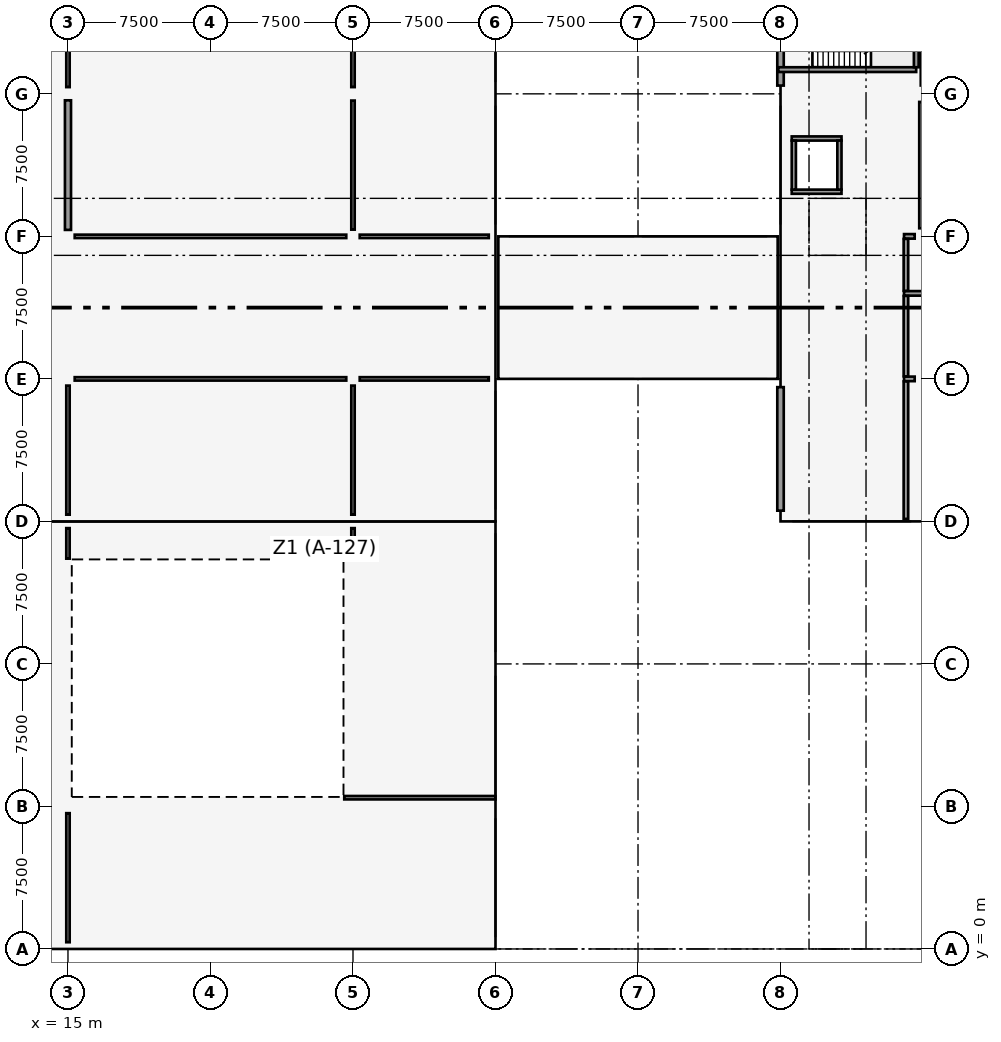
"""IFC4 building model, lengths in metres.
Left out: names, types, materials, properties, quantities, classifications, styles, units other than length and angle.
Written with IfcOpenShell. Run it as: python <this file> out.ifc"""

import sys

from ifc_helpers import new_model, si_unit, direction, frame, frame_2d, origin, origin_2d, place, context, subcontext, project, spatial, rectangle, extrude, element, fill, save


model = new_model("IFC4")
c1 = context("Model", 3, precision=1e-05, world=origin(), true_north=direction((0.0, 1.0)))
c2 = subcontext(c1, "Body", "Model", "MODEL_VIEW")
j1 = project(units=[si_unit("LENGTHUNIT", "METRE"), si_unit("PLANEANGLEUNIT", "RADIAN")], contexts=[c1])
p1 = place(None, origin())
s1 = spatial("IfcSite", under=j1, at=p1, CompositionType="ELEMENT")
p2 = place(p1, origin())
s2 = spatial("IfcBuilding", under=s1, at=p2, CompositionType="ELEMENT")
p3 = place(p2, frame((0.0, 0.0, 4.8)))
s3 = spatial("IfcBuildingStorey", under=s2, at=p3, CompositionType="ELEMENT", Elevation=4.8)
p4 = place(p3, frame((52.5, 22.5, 0.0), z_axis=(0.0, 0.0, 1.0), x_axis=(1.0, 0.0, 0.0)))
e1 = element("IfcColumn", 1, at=p4, inside=s3, PredefinedType="COLUMN", context=c2, shape_type="SweptSolid", body=[
    extrude(rectangle(XDim=0.6, YDim=1.1, at=origin_2d()), origin(), (0.0, 0.0, 1.0), 4.2),
])
for number, where, z_axis, x_axis in (
    (2, (52.5, 30.0, 0.0), (0.0, 0.0, 1.0), (1.0, 0.0, 0.0)),
    (3, (52.5, 37.5, 0.0), (0.0, 0.0, 1.0), (1.0, 0.0, 0.0)),
    (4, (52.5, 45.0, 0.0), (0.0, 0.0, 1.0), (1.0, 0.0, 0.0)),
    (5, (60.0, 22.5, 0.0), (0.0, 0.0, 1.0), (1.0, 0.0, 0.0)),
    (6, (60.0, 30.0, 0.0), (0.0, 0.0, 1.0), (1.0, 0.0, 0.0)),
    (7, (60.0, 37.5, 0.0), (0.0, 0.0, 1.0), (1.0, 0.0, 0.0)),
    (8, (60.0, 45.0, 0.0), (0.0, 0.0, 1.0), (1.0, 0.0, 0.0)),
):
    element("IfcColumn", number, at=place(p3, frame(where, z_axis=z_axis, x_axis=x_axis)), inside=s3, PredefinedType="COLUMN", context=c2, shape_type="SweptSolid", body=[
        extrude(rectangle(XDim=0.85, YDim=0.85, at=origin_2d()), origin(), (0.0, 0.0, 1.0), 4.2),
    ])
for number, where, z_axis, x_axis in (
    (9, (15.0, 0.0, 0.0), (0.0, 0.0, 1.0), (1.0, 0.0, 0.0)),
    (10, (15.0, 7.5, 0.0), (0.0, 0.0, 1.0), (1.0, 0.0, 0.0)),
    (11, (15.0, 15.0, 0.0), (0.0, 0.0, 1.0), (1.0, 0.0, 0.0)),
    (12, (15.0, 22.5, 0.0), (0.0, 0.0, 1.0), (1.0, 0.0, 0.0)),
    (13, (15.0, 30.0, 0.0), (0.0, 0.0, 1.0), (1.0, 0.0, 0.0)),
    (14, (15.0, 37.5, 0.0), (0.0, 0.0, 1.0), (1.0, 0.0, 0.0)),
    (15, (15.0, 45.0, 0.0), (0.0, 0.0, 1.0), (1.0, 0.0, 0.0)),
    (16, (30.0, 0.0, 0.0), (0.0, 0.0, 1.0), (1.0, 0.0, 0.0)),
    (17, (30.0, 7.5, 0.0), (0.0, 0.0, 1.0), (1.0, 0.0, 0.0)),
    (18, (30.0, 15.0, 0.0), (0.0, 0.0, 1.0), (1.0, 0.0, 0.0)),
    (19, (30.0, 22.5, 0.0), (0.0, 0.0, 1.0), (1.0, 0.0, 0.0)),
    (20, (30.0, 30.0, 0.0), (0.0, 0.0, 1.0), (1.0, 0.0, 0.0)),
    (21, (30.0, 37.5, 0.0), (0.0, 0.0, 1.0), (1.0, 0.0, 0.0)),
    (22, (30.0, 45.0, 0.0), (0.0, 0.0, 1.0), (1.0, 0.0, 0.0)),
    (23, (37.5, 0.0, 0.0), (0.0, 0.0, 1.0), (1.0, 0.0, 0.0)),
    (24, (37.5, 7.5, 0.0), (0.0, 0.0, 1.0), (1.0, 0.0, 0.0)),
    (25, (37.5, 15.0, 0.0), (0.0, 0.0, 1.0), (1.0, 0.0, 0.0)),
    (26, (37.5, 22.5, 0.0), (0.0, 0.0, 1.0), (1.0, 0.0, 0.0)),
    (27, (37.5, 30.0, 0.0), (0.0, 0.0, 1.0), (1.0, 0.0, 0.0)),
    (28, (37.5, 37.5, 0.0), (0.0, 0.0, 1.0), (1.0, 0.0, 0.0)),
    (29, (37.5, 45.0, 0.0), (0.0, 0.0, 1.0), (1.0, 0.0, 0.0)),
):
    element("IfcColumn", number, at=place(p3, frame(where, z_axis=z_axis, x_axis=x_axis)), inside=s3, PredefinedType="COLUMN", context=c2, shape_type="SweptSolid", body=[
        extrude(rectangle(XDim=0.68, YDim=0.68, at=origin_2d()), origin(), (0.0, 0.0, 1.0), 4.2),
    ])
p5 = place(p3, frame((60.0, 37.925, 0.0), z_axis=(0.0, 0.0, 1.0), x_axis=(0.0, 1.0, 0.0)))
e30 = element("IfcWall", 30, at=p5, inside=s3, PredefinedType="SHEAR", context=c2, shape_type="SweptSolid", body=[
    extrude(rectangle(XDim=6.65, YDim=0.4, at=frame_2d((3.325, 0.0))), origin(), (0.0, 0.0, 1.0), 2.72),
])
p6 = place(p3, frame((15.0, 37.84, 0.0), z_axis=(0.0, 0.0, 1.0), x_axis=(0.0, 1.0, 0.0)))
e31 = element("IfcWall", 31, at=p6, inside=s3, PredefinedType="SHEAR", context=c2, shape_type="SweptSolid", body=[
    extrude(rectangle(XDim=6.82, YDim=0.32, at=frame_2d((3.41, 0.0))), origin(), (0.0, 0.0, 1.0), 3.9),
])
p7 = place(p3, frame((52.5, 23.065, 0.0), z_axis=(0.0, 0.0, 1.0), x_axis=(0.0, 1.0, 0.0)))
e32 = element("IfcWall", 32, at=p7, inside=s3, PredefinedType="SOLIDWALL", context=c2, shape_type="SweptSolid", body=[
    extrude(rectangle(XDim=6.5, YDim=0.34, at=frame_2d((3.25, 0.0))), origin(), (0.0, 0.0, 1.0), 2.69),
])
p8 = place(p3, frame((52.5, 45.435, 0.0), z_axis=(0.0, 0.0, 1.0), x_axis=(0.0, 1.0, 0.0)))
e33 = element("IfcWall", 33, at=p8, inside=s3, PredefinedType="SOLIDWALL", context=c2, shape_type="SweptSolid", body=[
    extrude(rectangle(XDim=6.63, YDim=0.34, at=frame_2d((3.315, 0.0))), origin(), (0.0, 0.0, 1.0), 2.84),
])
p9 = place(p3, frame((52.38, 46.275, 0.0), z_axis=(0.0, 0.0, 1.0), x_axis=(1.0, 0.0, 0.0)))
e34 = element("IfcWall", 34, at=p9, inside=s3, PredefinedType="SOLIDWALL", context=c2, shape_type="SweptSolid", body=[
    extrude(rectangle(XDim=7.26, YDim=0.25, at=frame_2d((3.63, 0.0))), origin(), (0.0, 0.0, 1.0), 3.92),
])
p10 = place(p9, frame((0.62, 0.0, 0.0)))
e35 = element("IfcOpeningElement", 35, at=p10, cuts=e34, PredefinedType="OPENING", context=c2, shape_type="SweptSolid", body=[
    extrude(rectangle(XDim=1.1, YDim=2.15, at=frame_2d((0.55, 1.075))), frame((0.0, 0.135, 0.0), z_axis=(0.0, -1.0, 0.0), x_axis=(1.0, 0.0, 0.0)), (0.0, 0.0, 1.0), 0.27),
])
p11 = place(p3, frame((59.645, 46.4, 0.0), z_axis=(0.0, 0.0, 1.0), x_axis=(0.0, 1.0, 0.0)))
e36 = element("IfcWall", 36, at=p11, inside=s3, PredefinedType="SOLIDWALL", context=c2, shape_type="SweptSolid", body=[
    extrude(rectangle(XDim=3.56, YDim=0.25, at=frame_2d((1.78, 0.0))), origin(), (0.0, 0.0, 1.0), 3.92),
])
for number, where, z_axis, x_axis in (
    (37, (53.09, 39.85, 0.0), (0.0, 0.0, 1.0), (1.0, 0.0, 0.0)),
    (38, (53.09, 42.65, 0.0), (0.0, 0.0, 1.0), (1.0, 0.0, 0.0)),
):
    element("IfcWall", number, at=place(p3, frame(where, z_axis=z_axis, x_axis=x_axis)), inside=s3, PredefinedType="SOLIDWALL", context=c2, shape_type="SweptSolid", body=[
        extrude(rectangle(XDim=2.62, YDim=0.22, at=frame_2d((1.31, 0.0))), origin(), (0.0, 0.0, 1.0), 3.92),
    ])
p12 = place(p3, frame((53.2, 39.96, 0.0), z_axis=(0.0, 0.0, 1.0), x_axis=(0.0, 1.0, 0.0)))
e39 = element("IfcWall", 39, at=p12, inside=s3, PredefinedType="SOLIDWALL", context=c2, shape_type="SweptSolid", body=[
    extrude(rectangle(XDim=2.58, YDim=0.22, at=frame_2d((1.29, 0.0))), origin(), (0.0, 0.0, 1.0), 3.92),
])
p13 = place(p3, frame((55.6, 39.96, 0.0), z_axis=(0.0, 0.0, 1.0), x_axis=(0.0, 1.0, 0.0)))
e40 = element("IfcWall", 40, at=p13, inside=s3, PredefinedType="SOLIDWALL", context=c2, shape_type="SweptSolid", body=[
    extrude(rectangle(XDim=2.58, YDim=0.22, at=frame_2d((1.29, 0.0))), origin(), (0.0, 0.0, 1.0), 3.92),
])
p14 = place(p13, frame((0.79, 0.0, 0.0)))
e41 = element("IfcOpeningElement", 41, at=p14, cuts=e40, PredefinedType="OPENING", context=c2, shape_type="SweptSolid", body=[
    extrude(rectangle(XDim=1.0, YDim=2.15, at=frame_2d((0.5, 1.075))), frame((0.0, 0.12, 0.0), z_axis=(0.0, -1.0, 0.0), x_axis=(1.0, 0.0, 0.0)), (0.0, 0.0, 1.0), 0.24),
])
p15 = place(p3, frame((29.54, 7.96, 0.0), z_axis=(0.0, 0.0, 1.0), x_axis=(1.0, 0.0, 0.0)))
e42 = element("IfcWall", 42, at=p15, inside=s3, PredefinedType="PARTITIONING", context=c2, shape_type="SweptSolid", body=[
    extrude(rectangle(XDim=7.96, YDim=0.18, at=frame_2d((3.98, 0.0))), origin(), (0.0, 0.0, 1.0), 2.89),
])
p16 = place(p15, frame((3.46, 0.0, 0.0)))
e43 = element("IfcOpeningElement", 43, at=p16, cuts=e42, PredefinedType="OPENING", context=c2, shape_type="SweptSolid", body=[
    extrude(rectangle(XDim=1.5, YDim=2.16, at=frame_2d((0.75, 1.08))), frame((0.0, 0.1, 0.0), z_axis=(0.0, -1.0, 0.0), x_axis=(1.0, 0.0, 0.0)), (0.0, 0.0, 1.0), 0.2),
])
p17 = place(p3, frame((15.354, 30.0, 0.0), z_axis=(0.0, 0.0, 1.0), x_axis=(1.0, 0.0, 0.0)))
e44 = element("IfcWall", 44, at=p17, inside=s3, PredefinedType="PARTITIONING", context=c2, shape_type="SweptSolid", body=[
    extrude(rectangle(XDim=14.292, YDim=0.18, at=frame_2d((7.146, 0.0))), origin(), (0.0, 0.0, 1.0), 2.84),
])
p18 = place(p3, frame((30.354, 30.0, 0.0), z_axis=(0.0, 0.0, 1.0), x_axis=(1.0, 0.0, 0.0)))
e45 = element("IfcWall", 45, at=p18, inside=s3, PredefinedType="PARTITIONING", context=c2, shape_type="SweptSolid", body=[
    extrude(rectangle(XDim=6.792, YDim=0.18, at=frame_2d((3.396, 0.0))), origin(), (0.0, 0.0, 1.0), 2.84),
])
p19 = place(p18, frame((2.646, 0.0, 0.0)))
e46 = element("IfcOpeningElement", 46, at=p19, cuts=e45, PredefinedType="OPENING", context=c2, shape_type="SweptSolid", body=[
    extrude(rectangle(XDim=1.5, YDim=2.16, at=frame_2d((0.75, 1.08))), frame((0.0, 0.1, 0.0), z_axis=(0.0, -1.0, 0.0), x_axis=(1.0, 0.0, 0.0)), (0.0, 0.0, 1.0), 0.2),
])
p20 = place(p3, frame((15.354, 37.5, 0.0), z_axis=(0.0, 0.0, 1.0), x_axis=(1.0, 0.0, 0.0)))
e47 = element("IfcWall", 47, at=p20, inside=s3, PredefinedType="PARTITIONING", context=c2, shape_type="SweptSolid", body=[
    extrude(rectangle(XDim=14.292, YDim=0.18, at=frame_2d((7.146, 0.0))), origin(), (0.0, 0.0, 1.0), 2.89),
])
p21 = place(p3, frame((30.354, 37.5, 0.0), z_axis=(0.0, 0.0, 1.0), x_axis=(1.0, 0.0, 0.0)))
e48 = element("IfcWall", 48, at=p21, inside=s3, PredefinedType="PARTITIONING", context=c2, shape_type="SweptSolid", body=[
    extrude(rectangle(XDim=6.792, YDim=0.18, at=frame_2d((3.396, 0.0))), origin(), (0.0, 0.0, 1.0), 2.89),
])
p22 = place(p21, frame((2.646, 0.0, 0.0)))
e49 = element("IfcOpeningElement", 49, at=p22, cuts=e48, PredefinedType="OPENING", context=c2, shape_type="SweptSolid", body=[
    extrude(rectangle(XDim=1.5, YDim=2.16, at=frame_2d((0.75, 1.08))), frame((0.0, 0.1, 0.0), z_axis=(0.0, -1.0, 0.0), x_axis=(1.0, 0.0, 0.0)), (0.0, 0.0, 1.0), 0.2),
])
p23 = place(p3, frame((30.0, 20.54, 0.0), z_axis=(0.0, 0.0, 1.0), x_axis=(0.0, 1.0, 0.0)))
e50 = element("IfcWall", 50, at=p23, inside=s3, PredefinedType="PARTITIONING", context=c2, shape_type="SweptSolid", body=[
    extrude(rectangle(XDim=1.606, YDim=0.18, at=frame_2d((0.803, 0.0))), origin(), (0.0, 0.0, 1.0), 2.89),
])
p24 = place(p3, frame((30.0, 22.854, 0.0), z_axis=(0.0, 0.0, 1.0), x_axis=(0.0, 1.0, 0.0)))
e51 = element("IfcWall", 51, at=p24, inside=s3, PredefinedType="PARTITIONING", context=c2, shape_type="SweptSolid", body=[
    extrude(rectangle(XDim=6.792, YDim=0.18, at=frame_2d((3.396, 0.0))), origin(), (0.0, 0.0, 1.0), 2.84),
])
for number, where, z_axis, x_axis in (
    (52, (30.0, 37.854, 0.0), (0.0, 0.0, 1.0), (0.0, 1.0, 0.0)),
    (53, (30.0, 45.354, 0.0), (0.0, 0.0, 1.0), (0.0, 1.0, 0.0)),
):
    element("IfcWall", number, at=place(p3, frame(where, z_axis=z_axis, x_axis=x_axis)), inside=s3, PredefinedType="PARTITIONING", context=c2, shape_type="SweptSolid", body=[
        extrude(rectangle(XDim=6.792, YDim=0.18, at=frame_2d((3.396, 0.0))), origin(), (0.0, 0.0, 1.0), 2.89),
    ])
p25 = place(p3, frame((15.0, 0.354, 0.0), z_axis=(0.0, 0.0, 1.0), x_axis=(0.0, 1.0, 0.0)))
e54 = element("IfcWall", 54, at=p25, inside=s3, PredefinedType="PARTITIONING", context=c2, shape_type="SweptSolid", body=[
    extrude(rectangle(XDim=6.792, YDim=0.18, at=frame_2d((3.396, 0.0))), origin(), (0.0, 0.0, 1.0), 2.89),
])
p26 = place(p25, frame((2.446, 0.0, 0.0)))
e55 = element("IfcOpeningElement", 55, at=p26, cuts=e54, PredefinedType="OPENING", context=c2, shape_type="SweptSolid", body=[
    extrude(rectangle(XDim=1.9, YDim=2.18, at=frame_2d((0.95, 1.09))), frame((0.0, 0.1, 0.0), z_axis=(0.0, -1.0, 0.0), x_axis=(1.0, 0.0, 0.0)), (0.0, 0.0, 1.0), 0.2),
])
p27 = place(p3, frame((15.0, 20.54, 0.0), z_axis=(0.0, 0.0, 1.0), x_axis=(0.0, 1.0, 0.0)))
e56 = element("IfcWall", 56, at=p27, inside=s3, PredefinedType="PARTITIONING", context=c2, shape_type="SweptSolid", body=[
    extrude(rectangle(XDim=1.606, YDim=0.18, at=frame_2d((0.803, 0.0))), origin(), (0.0, 0.0, 1.0), 2.89),
])
p28 = place(p3, frame((15.0, 22.854, 0.0), z_axis=(0.0, 0.0, 1.0), x_axis=(0.0, 1.0, 0.0)))
e57 = element("IfcWall", 57, at=p28, inside=s3, PredefinedType="PARTITIONING", context=c2, shape_type="SweptSolid", body=[
    extrude(rectangle(XDim=6.792, YDim=0.18, at=frame_2d((3.396, 0.0))), origin(), (0.0, 0.0, 1.0), 2.89),
])
p29 = place(p28, frame((2.646, 0.0, 0.0)))
e58 = element("IfcOpeningElement", 58, at=p29, cuts=e57, PredefinedType="OPENING", context=c2, shape_type="SweptSolid", body=[
    extrude(rectangle(XDim=1.5, YDim=2.16, at=frame_2d((0.75, 1.08))), frame((0.0, 0.1, 0.0), z_axis=(0.0, -1.0, 0.0), x_axis=(1.0, 0.0, 0.0)), (0.0, 0.0, 1.0), 0.2),
])
p30 = place(p3, frame((15.0, 45.354, 0.0), z_axis=(0.0, 0.0, 1.0), x_axis=(0.0, 1.0, 0.0)))
e59 = element("IfcWall", 59, at=p30, inside=s3, PredefinedType="PARTITIONING", context=c2, shape_type="SweptSolid", body=[
    extrude(rectangle(XDim=6.792, YDim=0.18, at=frame_2d((3.396, 0.0))), origin(), (0.0, 0.0, 1.0), 2.89),
])
p31 = place(p30, frame((2.646, 0.0, 0.0)))
e60 = element("IfcOpeningElement", 60, at=p31, cuts=e59, PredefinedType="OPENING", context=c2, shape_type="SweptSolid", body=[
    extrude(rectangle(XDim=1.5, YDim=2.16, at=frame_2d((0.75, 1.08))), frame((0.0, 0.1, 0.0), z_axis=(0.0, -1.0, 0.0), x_axis=(1.0, 0.0, 0.0)), (0.0, 0.0, 1.0), 0.2),
])
for number, where, z_axis, x_axis in (
    (61, (59.0, 30.0, 0.0), (0.0, 0.0, 1.0), (1.0, 0.0, 0.0)),
    (62, (59.0, 37.5, 0.0), (0.0, 0.0, 1.0), (1.0, 0.0, 0.0)),
):
    element("IfcWall", number, at=place(p3, frame(where, z_axis=z_axis, x_axis=x_axis)), inside=s3, PredefinedType="PARTITIONING", context=c2, shape_type="SweptSolid", body=[
        extrude(rectangle(XDim=0.561, YDim=0.24, at=frame_2d((0.281, 0.0))), origin(), (0.0, 0.0, 1.0), 2.69),
    ])
p32 = place(p3, frame((59.0, 34.5, 0.0), z_axis=(0.0, 0.0, 1.0), x_axis=(1.0, 0.0, 0.0)))
e63 = element("IfcWall", 63, at=p32, inside=s3, PredefinedType="PARTITIONING", context=c2, shape_type="SweptSolid", body=[
    extrude(rectangle(XDim=39.5, YDim=0.24, at=frame_2d((19.75, 0.0))), origin(), (0.0, 0.0, 1.0), 2.69),
])
p33 = place(p32, frame((3.85, 0.0, 0.0)))
e64 = element("IfcOpeningElement", 64, at=p33, cuts=e63, PredefinedType="OPENING", context=c2, shape_type="SweptSolid", body=[
    extrude(rectangle(XDim=1.8, YDim=2.16, at=frame_2d((0.9, 1.08))), frame((0.0, 0.13, 0.0), z_axis=(0.0, -1.0, 0.0), x_axis=(1.0, 0.0, 0.0)), (0.0, 0.0, 1.0), 0.26),
])
p34 = place(p32, frame((33.85, 0.0, 0.0)))
e65 = element("IfcOpeningElement", 65, at=p34, cuts=e63, PredefinedType="OPENING", context=c2, shape_type="SweptSolid", body=[
    extrude(rectangle(XDim=1.8, YDim=2.16, at=frame_2d((0.9, 1.08))), frame((0.0, 0.13, 0.0), z_axis=(0.0, -1.0, 0.0), x_axis=(1.0, 0.0, 0.0)), (0.0, 0.0, 1.0), 0.26),
])
p35 = place(p3, frame((59.1, 22.632, 0.0), z_axis=(0.0, 0.0, 1.0), x_axis=(0.0, 1.0, 0.0)))
e66 = element("IfcWall", 66, at=p35, inside=s3, PredefinedType="PARTITIONING", context=c2, shape_type="SweptSolid", body=[
    extrude(rectangle(XDim=7.234, YDim=0.24, at=frame_2d((3.617, 0.0))), origin(), (0.0, 0.0, 1.0), 2.94),
])
p36 = place(p35, frame((2.868, 0.0, 0.0)))
e67 = element("IfcOpeningElement", 67, at=p36, cuts=e66, PredefinedType="OPENING", context=c2, shape_type="SweptSolid", body=[
    extrude(rectangle(XDim=1.5, YDim=2.16, at=frame_2d((0.75, 1.08))), frame((0.0, 0.13, 0.0), z_axis=(0.0, -1.0, 0.0), x_axis=(1.0, 0.0, 0.0)), (0.0, 0.0, 1.0), 0.26),
])
p37 = place(p3, frame((59.1, 30.134, 0.0), z_axis=(0.0, 0.0, 1.0), x_axis=(0.0, 1.0, 0.0)))
e68 = element("IfcWall", 68, at=p37, inside=s3, PredefinedType="PARTITIONING", context=c2, shape_type="SweptSolid", body=[
    extrude(rectangle(XDim=4.232, YDim=0.24, at=frame_2d((2.116, 0.0))), origin(), (0.0, 0.0, 1.0), 2.94),
])
p38 = place(p37, frame((1.216, 0.0, 0.0)))
e69 = element("IfcOpeningElement", 69, at=p38, cuts=e68, PredefinedType="OPENING", context=c2, shape_type="SweptSolid", body=[
    extrude(rectangle(XDim=1.8, YDim=2.16, at=frame_2d((0.9, 1.08))), frame((0.0, 0.13, 0.0), z_axis=(0.0, -1.0, 0.0), x_axis=(1.0, 0.0, 0.0)), (0.0, 0.0, 1.0), 0.26),
])
p39 = place(p3, frame((59.1, 34.634, 0.0), z_axis=(0.0, 0.0, 1.0), x_axis=(0.0, 1.0, 0.0)))
e70 = element("IfcWall", 70, at=p39, inside=s3, PredefinedType="PARTITIONING", context=c2, shape_type="SweptSolid", body=[
    extrude(rectangle(XDim=2.732, YDim=0.24, at=frame_2d((1.366, 0.0))), origin(), (0.0, 0.0, 1.0), 2.99),
])
p40 = place(p3, frame((60.0, 45.439, 0.0), z_axis=(0.0, 0.0, 1.0), x_axis=(0.0, 1.0, 0.0)))
e71 = element("IfcWall", 71, at=p40, inside=s3, PredefinedType="PARTITIONING", context=c2, shape_type="SweptSolid", body=[
    extrude(rectangle(XDim=6.622, YDim=0.24, at=frame_2d((3.311, 0.0))), origin(), (0.0, 0.0, 1.0), 2.84),
])
p41 = place(p10, origin())
e72 = element("IfcDoor", 72, at=p41, inside=s3, OperationType="SINGLE_SWING_LEFT", PredefinedType="DOOR", context=c2, shape_type="SweptSolid", body=[
    extrude(rectangle(XDim=1.1, YDim=2.15, at=frame_2d((0.55, 1.075))), frame((0.0, 0.025, 0.0), z_axis=(0.0, -1.0, 0.0), x_axis=(1.0, 0.0, 0.0)), (0.0, 0.0, 1.0), 0.05),
])
fill(e35, e72)
p42 = place(p14, origin())
e73 = element("IfcDoor", 73, at=p42, inside=s3, OperationType="SLIDING_TO_LEFT", PredefinedType="DOOR", context=c2, shape_type="SweptSolid", body=[
    extrude(rectangle(XDim=1.0, YDim=2.15, at=frame_2d((0.5, 1.075))), frame((0.0, 0.025, 0.0), z_axis=(0.0, -1.0, 0.0), x_axis=(1.0, 0.0, 0.0)), (0.0, 0.0, 1.0), 0.05),
])
fill(e41, e73)
p43 = place(p16, origin())
e74 = element("IfcDoor", 74, at=p43, inside=s3, OperationType="SINGLE_SWING_RIGHT", PredefinedType="DOOR", context=c2, shape_type="SweptSolid", body=[
    extrude(rectangle(XDim=1.5, YDim=2.16, at=frame_2d((0.75, 1.08))), frame((0.0, 0.025, 0.0), z_axis=(0.0, -1.0, 0.0), x_axis=(1.0, 0.0, 0.0)), (0.0, 0.0, 1.0), 0.05),
])
fill(e43, e74)
p44 = place(p19, origin())
e75 = element("IfcDoor", 75, at=p44, inside=s3, OperationType="SINGLE_SWING_LEFT", PredefinedType="DOOR", context=c2, shape_type="SweptSolid", body=[
    extrude(rectangle(XDim=1.5, YDim=2.16, at=frame_2d((0.75, 1.08))), frame((0.0, 0.025, 0.0), z_axis=(0.0, -1.0, 0.0), x_axis=(1.0, 0.0, 0.0)), (0.0, 0.0, 1.0), 0.05),
])
fill(e46, e75)
p45 = place(p22, origin())
e76 = element("IfcDoor", 76, at=p45, inside=s3, OperationType="SINGLE_SWING_RIGHT", PredefinedType="DOOR", context=c2, shape_type="SweptSolid", body=[
    extrude(rectangle(XDim=1.5, YDim=2.16, at=frame_2d((0.75, 1.08))), frame((0.0, 0.025, 0.0), z_axis=(0.0, -1.0, 0.0), x_axis=(1.0, 0.0, 0.0)), (0.0, 0.0, 1.0), 0.05),
])
fill(e49, e76)
p46 = place(p26, origin())
e77 = element("IfcDoor", 77, at=p46, inside=s3, OperationType="SINGLE_SWING_LEFT", PredefinedType="DOOR", context=c2, shape_type="SweptSolid", body=[
    extrude(rectangle(XDim=1.9, YDim=2.18, at=frame_2d((0.95, 1.09))), frame((0.0, 0.025, 0.0), z_axis=(0.0, -1.0, 0.0), x_axis=(1.0, 0.0, 0.0)), (0.0, 0.0, 1.0), 0.05),
])
fill(e55, e77)
p47 = place(p29, origin())
e78 = element("IfcDoor", 78, at=p47, inside=s3, OperationType="SINGLE_SWING_RIGHT", PredefinedType="DOOR", context=c2, shape_type="SweptSolid", body=[
    extrude(rectangle(XDim=1.5, YDim=2.16, at=frame_2d((0.75, 1.08))), frame((0.0, 0.025, 0.0), z_axis=(0.0, -1.0, 0.0), x_axis=(1.0, 0.0, 0.0)), (0.0, 0.0, 1.0), 0.05),
])
fill(e58, e78)
p48 = place(p36, origin())
e79 = element("IfcDoor", 79, at=p48, inside=s3, OperationType="SINGLE_SWING_RIGHT", PredefinedType="DOOR", context=c2, shape_type="SweptSolid", body=[
    extrude(rectangle(XDim=1.5, YDim=2.16, at=frame_2d((0.75, 1.08))), frame((0.0, 0.025, 0.0), z_axis=(0.0, -1.0, 0.0), x_axis=(1.0, 0.0, 0.0)), (0.0, 0.0, 1.0), 0.05),
])
fill(e67, e79)
p49 = place(p38, origin())
e80 = element("IfcDoor", 80, at=p49, inside=s3, OperationType="SINGLE_SWING_LEFT", PredefinedType="DOOR", context=c2, shape_type="SweptSolid", body=[
    extrude(rectangle(XDim=1.8, YDim=2.16, at=frame_2d((0.9, 1.08))), frame((0.0, 0.025, 0.0), z_axis=(0.0, -1.0, 0.0), x_axis=(1.0, 0.0, 0.0)), (0.0, 0.0, 1.0), 0.05),
])
fill(e69, e80)
save(model, sys.argv[1])
